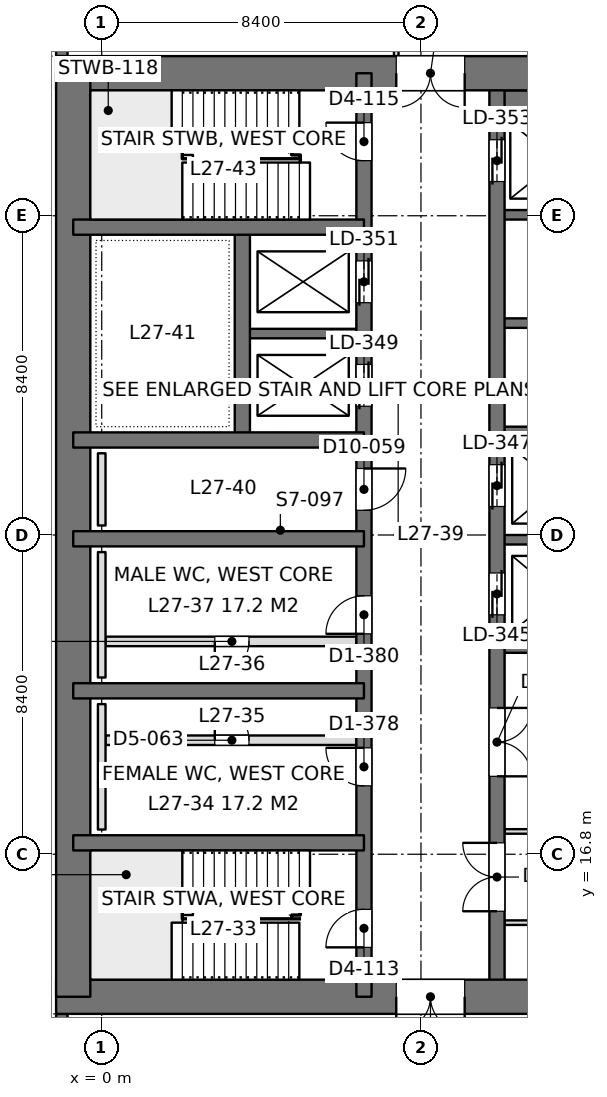
"""IFC4 building model, lengths in metres.
Left out: names, types, materials, properties, quantities, classifications, styles, units other than length and angle.
Written with IfcOpenShell. Run it as: python <this file> out.ifc"""

import sys

from ifc_helpers import new_model, si_unit, direction, frame, frame_2d, origin, place, context, subcontext, project, spatial, rectangle, extrude, element, fill, save


model = new_model("IFC4")
c1 = context("Model", 3, precision=1e-05, world=origin(), true_north=direction((0.0, 1.0)))
c2 = subcontext(c1, "Body", "Model", "MODEL_VIEW")
j1 = project(units=[si_unit("LENGTHUNIT", "METRE"), si_unit("PLANEANGLEUNIT", "RADIAN")], contexts=[c1])
p1 = place(None, origin())
s1 = spatial("IfcSite", under=j1, at=p1, CompositionType="ELEMENT")
p2 = place(p1, origin())
s2 = spatial("IfcBuilding", under=s1, at=p2, CompositionType="ELEMENT")
p3 = place(p2, frame((0.0, 0.0, 121.8)))
s3 = spatial("IfcBuildingStorey", under=s2, at=p3, CompositionType="ELEMENT", Elevation=121.8)
p4 = place(p3, frame((-1.2, 13.05, 0.0), z_axis=(0.0, 0.0, 1.0), x_axis=(1.0, 0.0, 0.0)))
e1 = element("IfcWall", 1, at=p4, inside=s3, PredefinedType="SHEAR", context=c2, shape_type="SweptSolid", body=[
    extrude(rectangle(XDim=18.0, YDim=0.9, at=frame_2d((9.0, 0.0))), origin(), (0.0, 0.0, 1.0), 4.2),
])
p5 = place(p4, frame((8.95, 0.0, 0.0)))
e2 = element("IfcOpeningElement", 2, at=p5, cuts=e1, PredefinedType="OPENING", context=c2, shape_type="SweptSolid", body=[
    extrude(rectangle(XDim=1.8, YDim=2.4, at=frame_2d((0.9, 1.2))), frame((0.0, 0.46, 0.0), z_axis=(0.0, -1.0, 0.0), x_axis=(1.0, 0.0, 0.0)), (0.0, 0.0, 1.0), 0.92),
])
p6 = place(p3, frame((-1.2, 37.35, 0.0), z_axis=(0.0, 0.0, 1.0), x_axis=(1.0, 0.0, 0.0)))
e3 = element("IfcWall", 3, at=p6, inside=s3, PredefinedType="SHEAR", context=c2, shape_type="SweptSolid", body=[
    extrude(rectangle(XDim=18.0, YDim=0.9, at=frame_2d((9.0, 0.0))), origin(), (0.0, 0.0, 1.0), 4.2),
])
p7 = place(p6, frame((8.95, 0.0, 0.0)))
e4 = element("IfcOpeningElement", 4, at=p7, cuts=e3, PredefinedType="OPENING", context=c2, shape_type="SweptSolid", body=[
    extrude(rectangle(XDim=1.8, YDim=2.4, at=frame_2d((0.9, 1.2))), frame((0.0, 0.46, 0.0), z_axis=(0.0, -1.0, 0.0), x_axis=(1.0, 0.0, 0.0)), (0.0, 0.0, 1.0), 0.92),
])
p8 = place(p3, frame((-0.75, 13.05, 0.0), z_axis=(0.0, 0.0, 1.0), x_axis=(0.0, 1.0, 0.0)))
e5 = element("IfcWall", 5, at=p8, inside=s3, PredefinedType="SHEAR", context=c2, shape_type="SweptSolid", body=[
    extrude(rectangle(XDim=24.3, YDim=0.9, at=frame_2d((12.15, 0.0))), origin(), (0.0, 0.0, 1.0), 4.2),
])
p9 = place(p3, frame((6.9, 13.05, 0.0), z_axis=(0.0, 0.0, 1.0), x_axis=(0.0, 1.0, 0.0)))
e6 = element("IfcWall", 6, at=p9, inside=s3, PredefinedType="SHEAR", context=c2, shape_type="SweptSolid", body=[
    extrude(rectangle(XDim=24.3, YDim=0.4, at=frame_2d((12.15, 0.0))), origin(), (0.0, 0.0, 1.0), 4.2),
])
p10 = place(p9, frame((1.3, 0.0, 0.0)))
e7 = element("IfcOpeningElement", 7, at=p10, cuts=e6, PredefinedType="OPENING", context=c2, shape_type="SweptSolid", body=[
    extrude(rectangle(XDim=1.0, YDim=2.2, at=frame_2d((0.5, 1.1))), frame((0.0, 0.21, 0.0), z_axis=(0.0, -1.0, 0.0), x_axis=(1.0, 0.0, 0.0)), (0.0, 0.0, 1.0), 0.42),
])
p11 = place(p9, frame((22.0, 0.0, 0.0)))
e8 = element("IfcOpeningElement", 8, at=p11, cuts=e6, PredefinedType="OPENING", context=c2, shape_type="SweptSolid", body=[
    extrude(rectangle(XDim=1.0, YDim=2.2, at=frame_2d((0.5, 1.1))), frame((0.0, 0.21, 0.0), z_axis=(0.0, -1.0, 0.0), x_axis=(1.0, 0.0, 0.0)), (0.0, 0.0, 1.0), 0.42),
])
p12 = place(p9, frame((5.55, 0.0, 0.0)))
e9 = element("IfcOpeningElement", 9, at=p12, cuts=e6, PredefinedType="OPENING", context=c2, shape_type="SweptSolid", body=[
    extrude(rectangle(XDim=1.0, YDim=2.2, at=frame_2d((0.5, 1.1))), frame((0.0, 0.21, 0.0), z_axis=(0.0, -1.0, 0.0), x_axis=(1.0, 0.0, 0.0)), (0.0, 0.0, 1.0), 0.42),
])
p13 = place(p9, frame((9.55, 0.0, 0.0)))
e10 = element("IfcOpeningElement", 10, at=p13, cuts=e6, PredefinedType="OPENING", context=c2, shape_type="SweptSolid", body=[
    extrude(rectangle(XDim=1.0, YDim=2.2, at=frame_2d((0.5, 1.1))), frame((0.0, 0.21, 0.0), z_axis=(0.0, -1.0, 0.0), x_axis=(1.0, 0.0, 0.0)), (0.0, 0.0, 1.0), 0.42),
])
p14 = place(p9, frame((12.8, 0.0, 0.0)))
e11 = element("IfcOpeningElement", 11, at=p14, cuts=e6, PredefinedType="OPENING", context=c2, shape_type="SweptSolid", body=[
    extrude(rectangle(XDim=1.1, YDim=2.2, at=frame_2d((0.55, 1.1))), frame((0.0, 0.21, 0.0), z_axis=(0.0, -1.0, 0.0), x_axis=(1.0, 0.0, 0.0)), (0.0, 0.0, 1.0), 0.42),
])
p15 = place(p9, frame((15.538, 0.0, 0.0)))
e12 = element("IfcOpeningElement", 12, at=p15, cuts=e6, PredefinedType="OPENING", context=c2, shape_type="SweptSolid", body=[
    extrude(rectangle(XDim=1.1, YDim=2.2, at=frame_2d((0.55, 1.1))), frame((0.0, 0.21, 0.0), z_axis=(0.0, -1.0, 0.0), x_axis=(1.0, 0.0, 0.0)), (0.0, 0.0, 1.0), 0.42),
])
p16 = place(p9, frame((18.262, 0.0, 0.0)))
e13 = element("IfcOpeningElement", 13, at=p16, cuts=e6, PredefinedType="OPENING", context=c2, shape_type="SweptSolid", body=[
    extrude(rectangle(XDim=1.1, YDim=2.2, at=frame_2d((0.55, 1.1))), frame((0.0, 0.21, 0.0), z_axis=(0.0, -1.0, 0.0), x_axis=(1.0, 0.0, 0.0)), (0.0, 0.0, 1.0), 0.42),
])
p17 = place(p3, frame((10.4, 13.05, 0.0), z_axis=(0.0, 0.0, 1.0), x_axis=(0.0, 1.0, 0.0)))
e14 = element("IfcWall", 14, at=p17, inside=s3, PredefinedType="SHEAR", context=c2, shape_type="SweptSolid", body=[
    extrude(rectangle(XDim=24.3, YDim=0.4, at=frame_2d((12.15, 0.0))), origin(), (0.0, 0.0, 1.0), 4.2),
])
p18 = place(p17, frame((10.05, 0.0, 0.0)))
e15 = element("IfcOpeningElement", 15, at=p18, cuts=e14, PredefinedType="OPENING", context=c2, shape_type="SweptSolid", body=[
    extrude(rectangle(XDim=1.1, YDim=2.2, at=frame_2d((0.55, 1.1))), frame((0.0, 0.21, 0.0), z_axis=(0.0, -1.0, 0.0), x_axis=(1.0, 0.0, 0.0)), (0.0, 0.0, 1.0), 0.42),
])
p19 = place(p17, frame((12.9, 0.0, 0.0)))
e16 = element("IfcOpeningElement", 16, at=p19, cuts=e14, PredefinedType="OPENING", context=c2, shape_type="SweptSolid", body=[
    extrude(rectangle(XDim=1.1, YDim=2.2, at=frame_2d((0.55, 1.1))), frame((0.0, 0.21, 0.0), z_axis=(0.0, -1.0, 0.0), x_axis=(1.0, 0.0, 0.0)), (0.0, 0.0, 1.0), 0.42),
])
p20 = place(p17, frame((21.45, 0.0, 0.0)))
e17 = element("IfcOpeningElement", 17, at=p20, cuts=e14, PredefinedType="OPENING", context=c2, shape_type="SweptSolid", body=[
    extrude(rectangle(XDim=1.1, YDim=2.2, at=frame_2d((0.55, 1.1))), frame((0.0, 0.21, 0.0), z_axis=(0.0, -1.0, 0.0), x_axis=(1.0, 0.0, 0.0)), (0.0, 0.0, 1.0), 0.42),
])
p21 = place(p17, frame((2.25, 0.0, 0.0)))
e18 = element("IfcOpeningElement", 18, at=p21, cuts=e14, PredefinedType="OPENING", context=c2, shape_type="SweptSolid", body=[
    extrude(rectangle(XDim=1.8, YDim=2.4, at=frame_2d((0.9, 1.2))), frame((0.0, 0.21, 0.0), z_axis=(0.0, -1.0, 0.0), x_axis=(1.0, 0.0, 0.0)), (0.0, 0.0, 1.0), 0.42),
])
p22 = place(p17, frame((5.8, 0.0, 0.0)))
e19 = element("IfcOpeningElement", 19, at=p22, cuts=e14, PredefinedType="OPENING", context=c2, shape_type="SweptSolid", body=[
    extrude(rectangle(XDim=1.8, YDim=2.4, at=frame_2d((0.9, 1.2))), frame((0.0, 0.21, 0.0), z_axis=(0.0, -1.0, 0.0), x_axis=(1.0, 0.0, 0.0)), (0.0, 0.0, 1.0), 0.42),
])
for number, where, z_axis, x_axis in (
    (20, (-0.75, 17.1, 0.0), (0.0, 0.0, 1.0), (1.0, 0.0, 0.0)),
    (21, (-0.75, 21.1, 0.0), (0.0, 0.0, 1.0), (1.0, 0.0, 0.0)),
    (22, (-0.75, 25.1, 0.0), (0.0, 0.0, 1.0), (1.0, 0.0, 0.0)),
    (23, (-0.75, 27.7, 0.0), (0.0, 0.0, 1.0), (1.0, 0.0, 0.0)),
    (24, (-0.75, 33.3, 0.0), (0.0, 0.0, 1.0), (1.0, 0.0, 0.0)),
):
    element("IfcWall", number, at=place(p3, frame(where, z_axis=z_axis, x_axis=x_axis)), inside=s3, PredefinedType="SHEAR", context=c2, shape_type="SweptSolid", body=[
        extrude(rectangle(XDim=7.65, YDim=0.4, at=frame_2d((3.825, 0.0))), origin(), (0.0, 0.0, 1.0), 4.2),
    ])
p23 = place(p3, frame((3.7, 27.7, 0.0), z_axis=(0.0, 0.0, 1.0), x_axis=(0.0, 1.0, 0.0)))
e25 = element("IfcWall", 25, at=p23, inside=s3, PredefinedType="SHEAR", context=c2, shape_type="SweptSolid", body=[
    extrude(rectangle(XDim=5.6, YDim=0.4, at=frame_2d((2.8, 0.0))), origin(), (0.0, 0.0, 1.0), 4.2),
])
p24 = place(p3, frame((3.7, 30.5, 0.0), z_axis=(0.0, 0.0, 1.0), x_axis=(1.0, 0.0, 0.0)))
e26 = element("IfcWall", 26, at=p24, inside=s3, PredefinedType="SHEAR", context=c2, shape_type="SweptSolid", body=[
    extrude(rectangle(XDim=3.2, YDim=0.25, at=frame_2d((1.6, 0.0))), origin(), (0.0, 0.0, 1.0), 4.2),
])
p25 = place(p3, frame((10.4, 22.225, 0.0), z_axis=(0.0, 0.0, 1.0), x_axis=(1.0, 0.0, 0.0)))
e27 = element("IfcWall", 27, at=p25, inside=s3, PredefinedType="SHEAR", context=c2, shape_type="SweptSolid", body=[
    extrude(rectangle(XDim=5.95, YDim=0.25, at=frame_2d((2.975, 0.0))), origin(), (0.0, 0.0, 1.0), 4.2),
])
for number, where, z_axis, x_axis in (
    (28, (10.4, 25.075, 0.0), (0.0, 0.0, 1.0), (1.0, 0.0, 0.0)),
    (29, (10.4, 27.925, 0.0), (0.0, 0.0, 1.0), (1.0, 0.0, 0.0)),
    (30, (10.4, 30.775, 0.0), (0.0, 0.0, 1.0), (1.0, 0.0, 0.0)),
    (31, (10.4, 33.625, 0.0), (0.0, 0.0, 1.0), (1.0, 0.0, 0.0)),
):
    element("IfcWall", number, at=place(p3, frame(where, z_axis=z_axis, x_axis=x_axis)), inside=s3, PredefinedType="SHEAR", context=c2, shape_type="SweptSolid", body=[
        extrude(rectangle(XDim=3.2, YDim=0.25, at=frame_2d((1.6, 0.0))), origin(), (0.0, 0.0, 1.0), 4.2),
    ])
p26 = place(p3, frame((10.4, 36.625, 0.0), z_axis=(0.0, 0.0, 1.0), x_axis=(1.0, 0.0, 0.0)))
e32 = element("IfcWall", 32, at=p26, inside=s3, PredefinedType="SHEAR", context=c2, shape_type="SweptSolid", body=[
    extrude(rectangle(XDim=3.2, YDim=0.55, at=frame_2d((1.6, 0.0))), origin(), (0.0, 0.0, 1.0), 4.2),
])
p27 = place(p3, frame((-1.05, 8.4, 0.0), z_axis=(0.0, 0.0, 1.0), x_axis=(0.0, 1.0, 0.0)))
e33 = element("IfcWall", 33, at=p27, inside=s3, PredefinedType="SOLIDWALL", context=c2, shape_type="SweptSolid", body=[
    extrude(rectangle(XDim=4.2, YDim=0.3, at=frame_2d((2.1, 0.0))), origin(), (0.0, 0.0, 1.0), 4.05),
])
p28 = place(p27, frame((0.9, 0.0, 0.9)))
e34 = element("IfcOpeningElement", 34, at=p28, cuts=e33, PredefinedType="OPENING", context=c2, shape_type="SweptSolid", body=[
    extrude(rectangle(XDim=2.4, YDim=1.9, at=frame_2d((1.2, 0.95))), frame((0.0, 0.16, 0.0), z_axis=(0.0, -1.0, 0.0), x_axis=(1.0, 0.0, 0.0)), (0.0, 0.0, 1.0), 0.32),
])
p29 = place(p3, frame((-1.05, 37.8, 0.0), z_axis=(0.0, 0.0, 1.0), x_axis=(0.0, 1.0, 0.0)))
e35 = element("IfcWall", 35, at=p29, inside=s3, PredefinedType="SOLIDWALL", context=c2, shape_type="SweptSolid", body=[
    extrude(rectangle(XDim=4.2, YDim=0.3, at=frame_2d((2.1, 0.0))), origin(), (0.0, 0.0, 1.0), 4.05),
])
p30 = place(p29, frame((0.9, 0.0, 0.9)))
e36 = element("IfcOpeningElement", 36, at=p30, cuts=e35, PredefinedType="OPENING", context=c2, shape_type="SweptSolid", body=[
    extrude(rectangle(XDim=2.4, YDim=1.9, at=frame_2d((1.2, 0.95))), frame((0.0, 0.16, 0.0), z_axis=(0.0, -1.0, 0.0), x_axis=(1.0, 0.0, 0.0)), (0.0, 0.0, 1.0), 0.32),
])
p31 = place(p3, frame((10.598, 17.4, 0.0), z_axis=(0.0, 0.0, 1.0), x_axis=(1.0, 0.0, 0.0)))
e37 = element("IfcWall", 37, at=p31, inside=s3, PredefinedType="PARTITIONING", context=c2, shape_type="SweptSolid", body=[
    extrude(rectangle(XDim=5.904, YDim=0.12, at=frame_2d((2.952, 0.0))), origin(), (0.0, 0.0, 1.0), 3.55),
])
p32 = place(p31, frame((4.524, 0.0, 0.0)))
e38 = element("IfcOpeningElement", 38, at=p32, cuts=e37, PredefinedType="OPENING", context=c2, shape_type="SweptSolid", body=[
    extrude(rectangle(XDim=1.0, YDim=2.4, at=frame_2d((0.5, 1.2))), frame((0.0, 0.07, 0.0), z_axis=(0.0, -1.0, 0.0), x_axis=(1.0, 0.0, 0.0)), (0.0, 0.0, 1.0), 0.14),
])
p33 = place(p3, frame((10.598, 15.0, 0.0), z_axis=(0.0, 0.0, 1.0), x_axis=(1.0, 0.0, 0.0)))
e39 = element("IfcWall", 39, at=p33, inside=s3, PredefinedType="PARTITIONING", context=c2, shape_type="SweptSolid", body=[
    extrude(rectangle(XDim=6.204, YDim=0.12, at=frame_2d((3.102, 0.0))), origin(), (0.0, 0.0, 1.0), 3.55),
])
p34 = place(p3, frame((7.75, 37.8, 0.0), z_axis=(0.0, 0.0, 1.0), x_axis=(0.0, 1.0, 0.0)))
e40 = element("IfcWall", 40, at=p34, inside=s3, PredefinedType="PARTITIONING", context=c2, shape_type="SweptSolid", body=[
    extrude(rectangle(XDim=2.0, YDim=0.12, at=frame_2d((1.0, 0.0))), origin(), (0.0, 0.0, 1.0), 4.05),
])
p35 = place(p3, frame((0.1, 22.4, 0.0), z_axis=(0.0, 0.0, 1.0), x_axis=(1.0, 0.0, 0.0)))
e41 = element("IfcWall", 41, at=p35, inside=s3, PredefinedType="PARTITIONING", context=c2, shape_type="SweptSolid", body=[
    extrude(rectangle(XDim=6.6, YDim=0.25, at=frame_2d((3.3, 0.0))), origin(), (0.0, 0.0, 1.0), 4.0),
])
p36 = place(p35, frame((2.875, 0.0, 0.0)))
e42 = element("IfcOpeningElement", 42, at=p36, cuts=e41, PredefinedType="OPENING", context=c2, shape_type="SweptSolid", body=[
    extrude(rectangle(XDim=0.9, YDim=2.2, at=frame_2d((0.45, 1.1))), frame((0.0, 0.135, 0.0), z_axis=(0.0, -1.0, 0.0), x_axis=(1.0, 0.0, 0.0)), (0.0, 0.0, 1.0), 0.27),
])
p37 = place(p3, frame((0.1, 19.8, 0.0), z_axis=(0.0, 0.0, 1.0), x_axis=(1.0, 0.0, 0.0)))
e43 = element("IfcWall", 43, at=p37, inside=s3, PredefinedType="PARTITIONING", context=c2, shape_type="SweptSolid", body=[
    extrude(rectangle(XDim=6.6, YDim=0.25, at=frame_2d((3.3, 0.0))), origin(), (0.0, 0.0, 1.0), 4.0),
])
p38 = place(p37, frame((2.875, 0.0, 0.0)))
e44 = element("IfcOpeningElement", 44, at=p38, cuts=e43, PredefinedType="OPENING", context=c2, shape_type="SweptSolid", body=[
    extrude(rectangle(XDim=0.9, YDim=2.2, at=frame_2d((0.45, 1.1))), frame((0.0, 0.135, 0.0), z_axis=(0.0, -1.0, 0.0), x_axis=(1.0, 0.0, 0.0)), (0.0, 0.0, 1.0), 0.27),
])
for number, where, z_axis, x_axis in (
    (45, (0.0, 17.45, 0.0), (0.0, 0.0, 1.0), (0.0, 1.0, 0.0)),
    (46, (0.0, 21.45, 0.0), (0.0, 0.0, 1.0), (0.0, 1.0, 0.0)),
):
    element("IfcWall", number, at=place(p3, frame(where, z_axis=z_axis, x_axis=x_axis)), inside=s3, PredefinedType="PLUMBINGWALL", context=c2, shape_type="SweptSolid", body=[
        extrude(rectangle(XDim=3.3, YDim=0.2, at=frame_2d((1.65, 0.0))), origin(), (0.0, 0.0, 1.0), 1.2),
    ])
p39 = place(p3, frame((0.0, 25.45, 0.0), z_axis=(0.0, 0.0, 1.0), x_axis=(0.0, 1.0, 0.0)))
e47 = element("IfcWall", 47, at=p39, inside=s3, PredefinedType="PLUMBINGWALL", context=c2, shape_type="SweptSolid", body=[
    extrude(rectangle(XDim=1.9, YDim=0.2, at=frame_2d((0.95, 0.0))), origin(), (0.0, 0.0, 1.0), 1.2),
])
p40 = place(p5, frame((1.8, 0.0, 0.0), z_axis=(0.0, 0.0, 1.0), x_axis=(-1.0, 0.0, 0.0)))
e48 = element("IfcDoor", 48, at=p40, inside=s3, OperationType="DOUBLE_DOOR_SINGLE_SWING", PredefinedType="DOOR", context=c2, shape_type="SweptSolid", body=[
    extrude(rectangle(XDim=1.8, YDim=2.4, at=frame_2d((0.9, 1.2))), frame((0.0, 0.025, 0.0), z_axis=(0.0, -1.0, 0.0), x_axis=(1.0, 0.0, 0.0)), (0.0, 0.0, 1.0), 0.05),
])
fill(e2, e48)
p41 = place(p7, frame((1.8, 0.0, 0.0), z_axis=(0.0, 0.0, 1.0), x_axis=(-1.0, 0.0, 0.0)))
e49 = element("IfcDoor", 49, at=p41, inside=s3, OperationType="DOUBLE_DOOR_SINGLE_SWING", PredefinedType="DOOR", context=c2, shape_type="SweptSolid", body=[
    extrude(rectangle(XDim=1.8, YDim=2.4, at=frame_2d((0.9, 1.2))), frame((0.0, 0.025, 0.0), z_axis=(0.0, -1.0, 0.0), x_axis=(1.0, 0.0, 0.0)), (0.0, 0.0, 1.0), 0.05),
])
fill(e4, e49)
p42 = place(p10, origin())
e50 = element("IfcDoor", 50, at=p42, inside=s3, OperationType="SINGLE_SWING_LEFT", PredefinedType="DOOR", context=c2, shape_type="SweptSolid", body=[
    extrude(rectangle(XDim=1.0, YDim=2.2, at=frame_2d((0.5, 1.1))), frame((0.0, 0.025, 0.0), z_axis=(0.0, -1.0, 0.0), x_axis=(1.0, 0.0, 0.0)), (0.0, 0.0, 1.0), 0.05),
])
fill(e7, e50)
p43 = place(p11, origin())
e51 = element("IfcDoor", 51, at=p43, inside=s3, OperationType="SINGLE_SWING_RIGHT", PredefinedType="DOOR", context=c2, shape_type="SweptSolid", body=[
    extrude(rectangle(XDim=1.0, YDim=2.2, at=frame_2d((0.5, 1.1))), frame((0.0, 0.025, 0.0), z_axis=(0.0, -1.0, 0.0), x_axis=(1.0, 0.0, 0.0)), (0.0, 0.0, 1.0), 0.05),
])
fill(e8, e51)
p44 = place(p12, origin())
e52 = element("IfcDoor", 52, at=p44, inside=s3, OperationType="SINGLE_SWING_RIGHT", PredefinedType="DOOR", context=c2, shape_type="SweptSolid", body=[
    extrude(rectangle(XDim=1.0, YDim=2.2, at=frame_2d((0.5, 1.1))), frame((0.0, 0.025, 0.0), z_axis=(0.0, -1.0, 0.0), x_axis=(1.0, 0.0, 0.0)), (0.0, 0.0, 1.0), 0.05),
])
fill(e9, e52)
p45 = place(p13, origin())
e53 = element("IfcDoor", 53, at=p45, inside=s3, OperationType="SINGLE_SWING_LEFT", PredefinedType="DOOR", context=c2, shape_type="SweptSolid", body=[
    extrude(rectangle(XDim=1.0, YDim=2.2, at=frame_2d((0.5, 1.1))), frame((0.0, 0.025, 0.0), z_axis=(0.0, -1.0, 0.0), x_axis=(1.0, 0.0, 0.0)), (0.0, 0.0, 1.0), 0.05),
])
fill(e10, e53)
p46 = place(p14, frame((1.1, 0.0, 0.0), z_axis=(0.0, 0.0, 1.0), x_axis=(-1.0, 0.0, 0.0)))
e54 = element("IfcDoor", 54, at=p46, inside=s3, OperationType="SINGLE_SWING_LEFT", PredefinedType="DOOR", context=c2, shape_type="SweptSolid", body=[
    extrude(rectangle(XDim=1.1, YDim=2.2, at=frame_2d((0.55, 1.1))), frame((0.0, 0.025, 0.0), z_axis=(0.0, -1.0, 0.0), x_axis=(1.0, 0.0, 0.0)), (0.0, 0.0, 1.0), 0.05),
])
fill(e11, e54)
p47 = place(p18, origin())
e55 = element("IfcDoor", 55, at=p47, inside=s3, OperationType="DOUBLE_DOOR_SLIDING", PredefinedType="DOOR", context=c2, shape_type="SweptSolid", body=[
    extrude(rectangle(XDim=1.1, YDim=2.2, at=frame_2d((0.55, 1.1))), frame((0.0, 0.025, 0.0), z_axis=(0.0, -1.0, 0.0), x_axis=(1.0, 0.0, 0.0)), (0.0, 0.0, 1.0), 0.05),
])
fill(e15, e55)
p48 = place(p19, origin())
e56 = element("IfcDoor", 56, at=p48, inside=s3, OperationType="DOUBLE_DOOR_SLIDING", PredefinedType="DOOR", context=c2, shape_type="SweptSolid", body=[
    extrude(rectangle(XDim=1.1, YDim=2.2, at=frame_2d((0.55, 1.1))), frame((0.0, 0.025, 0.0), z_axis=(0.0, -1.0, 0.0), x_axis=(1.0, 0.0, 0.0)), (0.0, 0.0, 1.0), 0.05),
])
fill(e16, e56)
p49 = place(p20, origin())
e57 = element("IfcDoor", 57, at=p49, inside=s3, OperationType="DOUBLE_DOOR_SLIDING", PredefinedType="DOOR", context=c2, shape_type="SweptSolid", body=[
    extrude(rectangle(XDim=1.1, YDim=2.2, at=frame_2d((0.55, 1.1))), frame((0.0, 0.025, 0.0), z_axis=(0.0, -1.0, 0.0), x_axis=(1.0, 0.0, 0.0)), (0.0, 0.0, 1.0), 0.05),
])
fill(e17, e57)
p50 = place(p15, origin())
e58 = element("IfcDoor", 58, at=p50, inside=s3, OperationType="DOUBLE_DOOR_SLIDING", PredefinedType="DOOR", context=c2, shape_type="SweptSolid", body=[
    extrude(rectangle(XDim=1.1, YDim=2.2, at=frame_2d((0.55, 1.1))), frame((0.0, 0.025, 0.0), z_axis=(0.0, -1.0, 0.0), x_axis=(1.0, 0.0, 0.0)), (0.0, 0.0, 1.0), 0.05),
])
fill(e12, e58)
p51 = place(p16, origin())
e59 = element("IfcDoor", 59, at=p51, inside=s3, OperationType="DOUBLE_DOOR_SLIDING", PredefinedType="DOOR", context=c2, shape_type="SweptSolid", body=[
    extrude(rectangle(XDim=1.1, YDim=2.2, at=frame_2d((0.55, 1.1))), frame((0.0, 0.025, 0.0), z_axis=(0.0, -1.0, 0.0), x_axis=(1.0, 0.0, 0.0)), (0.0, 0.0, 1.0), 0.05),
])
fill(e13, e59)
p52 = place(p21, origin())
e60 = element("IfcDoor", 60, at=p52, inside=s3, OperationType="DOUBLE_DOOR_SINGLE_SWING", PredefinedType="DOOR", context=c2, shape_type="SweptSolid", body=[
    extrude(rectangle(XDim=1.8, YDim=2.4, at=frame_2d((0.9, 1.2))), frame((0.0, 0.025, 0.0), z_axis=(0.0, -1.0, 0.0), x_axis=(1.0, 0.0, 0.0)), (0.0, 0.0, 1.0), 0.05),
])
fill(e18, e60)
p53 = place(p22, frame((1.8, 0.0, 0.0), z_axis=(0.0, 0.0, 1.0), x_axis=(-1.0, 0.0, 0.0)))
e61 = element("IfcDoor", 61, at=p53, inside=s3, OperationType="DOUBLE_DOOR_SINGLE_SWING", PredefinedType="DOOR", context=c2, shape_type="SweptSolid", body=[
    extrude(rectangle(XDim=1.8, YDim=2.4, at=frame_2d((0.9, 1.2))), frame((0.0, 0.025, 0.0), z_axis=(0.0, -1.0, 0.0), x_axis=(1.0, 0.0, 0.0)), (0.0, 0.0, 1.0), 0.05),
])
fill(e19, e61)
p54 = place(p36, frame((0.9, 0.0, 0.0), z_axis=(0.0, 0.0, 1.0), x_axis=(-1.0, 0.0, 0.0)))
e62 = element("IfcDoor", 62, at=p54, inside=s3, OperationType="SINGLE_SWING_RIGHT", PredefinedType="DOOR", context=c2, shape_type="SweptSolid", body=[
    extrude(rectangle(XDim=0.9, YDim=2.2, at=frame_2d((0.45, 1.1))), frame((0.0, 0.025, 0.0), z_axis=(0.0, -1.0, 0.0), x_axis=(1.0, 0.0, 0.0)), (0.0, 0.0, 1.0), 0.05),
])
fill(e42, e62)
p55 = place(p38, origin())
e63 = element("IfcDoor", 63, at=p55, inside=s3, OperationType="SINGLE_SWING_LEFT", PredefinedType="DOOR", context=c2, shape_type="SweptSolid", body=[
    extrude(rectangle(XDim=0.9, YDim=2.2, at=frame_2d((0.45, 1.1))), frame((0.0, 0.025, 0.0), z_axis=(0.0, -1.0, 0.0), x_axis=(1.0, 0.0, 0.0)), (0.0, 0.0, 1.0), 0.05),
])
fill(e44, e63)
save(model, sys.argv[1])
